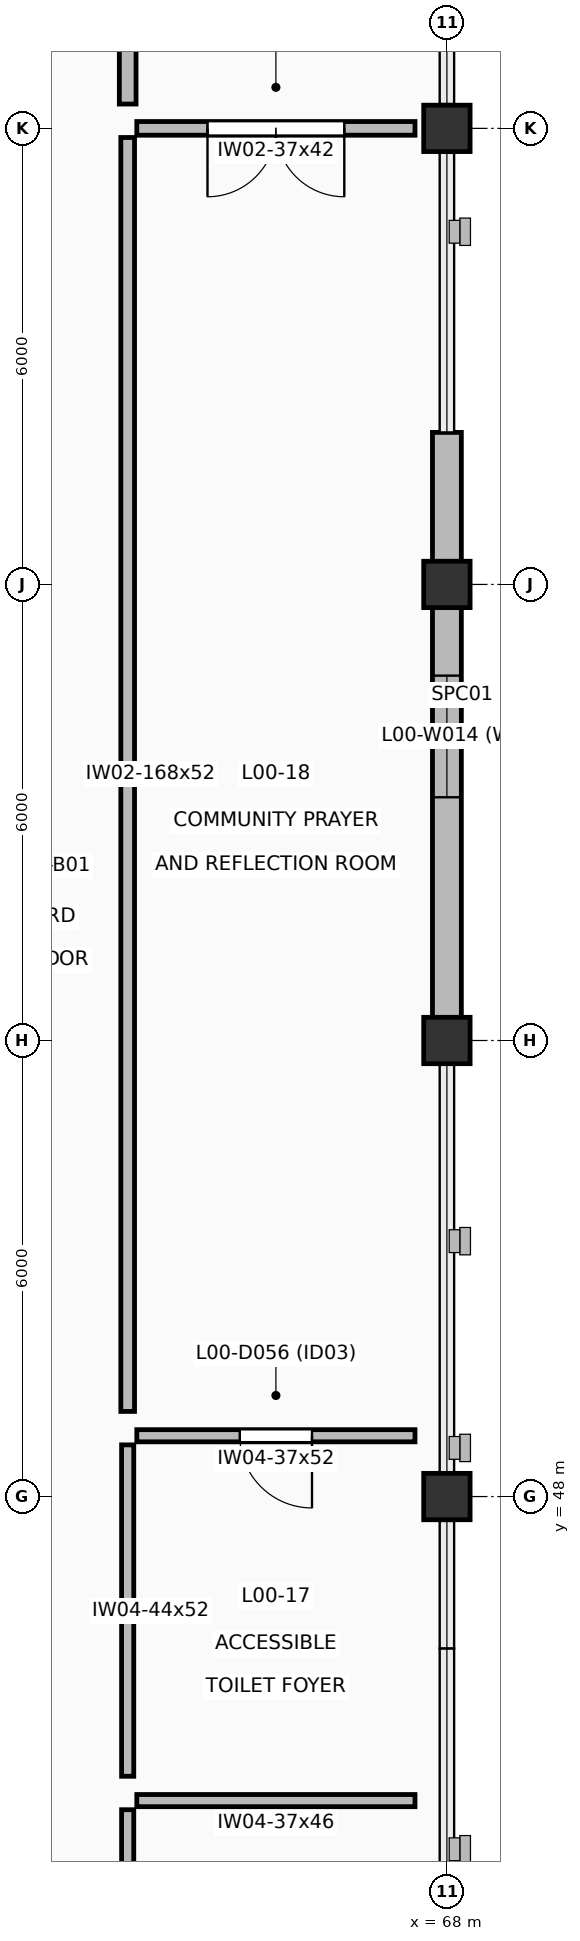
"""IFC4 building model, lengths in metres.
Left out: names, types, materials, properties, quantities, classifications, styles, units other than length and angle.
Written with IfcOpenShell. Run it as: python <this file> out.ifc"""

import sys

from ifc_helpers import new_model, si_unit, direction, frame, frame_2d, origin, origin_2d, place, context, subcontext, project, spatial, rectangle, extrude, element, fill, save


model = new_model("IFC4")
c1 = context("Model", 3, precision=1e-05, world=origin(), true_north=direction((0.0, 1.0)))
c2 = subcontext(c1, "Body", "Model", "MODEL_VIEW")
j1 = project(units=[si_unit("LENGTHUNIT", "METRE"), si_unit("PLANEANGLEUNIT", "RADIAN")], contexts=[c1])
p1 = place(None, origin())
s1 = spatial("IfcSite", under=j1, at=p1, CompositionType="ELEMENT")
p2 = place(p1, origin())
s2 = spatial("IfcBuilding", under=s1, at=p2, CompositionType="ELEMENT")
p3 = place(p2, origin())
s3 = spatial("IfcBuildingStorey", under=s2, at=p3, CompositionType="ELEMENT", Elevation=0.0)
for number, where, z_axis, x_axis in (
    (1, (68.0, 48.0, 0.0), (0.0, 0.0, 1.0), (1.0, 0.0, 0.0)),
    (2, (68.0, 54.0, 0.0), (0.0, 0.0, 1.0), (1.0, 0.0, 0.0)),
    (3, (68.0, 60.0, 0.0), (0.0, 0.0, 1.0), (1.0, 0.0, 0.0)),
    (4, (68.0, 66.0, 0.0), (0.0, 0.0, 1.0), (1.0, 0.0, 0.0)),
):
    element("IfcColumn", number, at=place(p3, frame(where, z_axis=z_axis, x_axis=x_axis)), inside=s3, PredefinedType="COLUMN", context=c2, shape_type="SweptSolid", body=[
        extrude(rectangle(XDim=0.61, YDim=0.61, at=origin_2d()), origin(), (0.0, 0.0, 1.0), 5.4),
    ])
p4 = place(p3, frame((68.0, 62.0, 0.0), z_axis=(0.0, 0.0, 1.0), x_axis=(0.0, -1.0, 0.0)))
e5 = element("IfcWall", 5, at=p4, inside=s3, PredefinedType="SOLIDWALL", context=c2, shape_type="SweptSolid", body=[
    extrude(rectangle(XDim=8.0, YDim=0.38, at=frame_2d((4.0, 0.0))), origin(), (0.0, 0.0, 1.0), 4.425),
])
p5 = place(p4, frame((3.2, 0.0, 0.85)))
e6 = element("IfcOpeningElement", 6, at=p5, cuts=e5, PredefinedType="OPENING", context=c2, shape_type="SweptSolid", body=[
    extrude(rectangle(XDim=1.6, YDim=2.0, at=frame_2d((0.8, 1.0))), frame((0.0, 0.2, 0.0), z_axis=(0.0, -1.0, 0.0), x_axis=(1.0, 0.0, 0.0)), (0.0, 0.0, 1.0), 0.4),
])
p6 = place(p3, frame((67.58, 44.0, 0.0), z_axis=(0.0, 0.0, 1.0), x_axis=(-1.0, 0.0, 0.0)))
e7 = element("IfcWall", 7, at=p6, inside=s3, PredefinedType="PLUMBINGWALL", context=c2, shape_type="SweptSolid", body=[
    extrude(rectangle(XDim=3.66, YDim=0.16, at=frame_2d((1.83, 0.0))), origin(), (0.0, 0.0, 1.0), 4.595),
])
p7 = place(p3, frame((63.8, 43.88, 0.0), z_axis=(0.0, 0.0, 1.0), x_axis=(0.0, -1.0, 0.0)))
e8 = element("IfcWall", 8, at=p7, inside=s3, PredefinedType="PLUMBINGWALL", context=c2, shape_type="SweptSolid", body=[
    extrude(rectangle(XDim=7.56, YDim=0.16, at=frame_2d((3.78, 0.0))), origin(), (0.0, 0.0, 1.0), 5.16),
])
p8 = place(p3, frame((67.58, 48.8, 0.0), z_axis=(0.0, 0.0, 1.0), x_axis=(-1.0, 0.0, 0.0)))
e9 = element("IfcWall", 9, at=p8, inside=s3, PredefinedType="PLUMBINGWALL", context=c2, shape_type="SweptSolid", body=[
    extrude(rectangle(XDim=3.66, YDim=0.16, at=frame_2d((1.83, 0.0))), origin(), (0.0, 0.0, 1.0), 5.16),
])
p9 = place(p8, frame((1.355, 0.0, 0.0)))
e10 = element("IfcOpeningElement", 10, at=p9, cuts=e9, PredefinedType="OPENING", context=c2, shape_type="SweptSolid", body=[
    extrude(rectangle(XDim=0.95, YDim=2.15, at=frame_2d((0.475, 1.075))), frame((0.0, 0.09, 0.0), z_axis=(0.0, -1.0, 0.0), x_axis=(1.0, 0.0, 0.0)), (0.0, 0.0, 1.0), 0.18),
])
p10 = place(p3, frame((63.8, 48.68, 0.0), z_axis=(0.0, 0.0, 1.0), x_axis=(0.0, -1.0, 0.0)))
e11 = element("IfcWall", 11, at=p10, inside=s3, PredefinedType="PLUMBINGWALL", context=c2, shape_type="SweptSolid", body=[
    extrude(rectangle(XDim=4.36, YDim=0.16, at=frame_2d((2.18, 0.0))), origin(), (0.0, 0.0, 1.0), 5.16),
])
p11 = place(p3, frame((67.58, 66.0, 0.0), z_axis=(0.0, 0.0, 1.0), x_axis=(-1.0, 0.0, 0.0)))
e12 = element("IfcWall", 12, at=p11, inside=s3, PredefinedType="PARTITIONING", context=c2, shape_type="SweptSolid", body=[
    extrude(rectangle(XDim=3.66, YDim=0.18, at=frame_2d((1.83, 0.0))), origin(), (0.0, 0.0, 1.0), 4.245),
])
p12 = place(p11, frame((0.93, 0.0, 0.0)))
e13 = element("IfcOpeningElement", 13, at=p12, cuts=e12, PredefinedType="OPENING", context=c2, shape_type="SweptSolid", body=[
    extrude(rectangle(XDim=1.8, YDim=2.3, at=frame_2d((0.9, 1.15))), frame((0.0, 0.1, 0.0), z_axis=(0.0, -1.0, 0.0), x_axis=(1.0, 0.0, 0.0)), (0.0, 0.0, 1.0), 0.2),
])
p13 = place(p3, frame((63.8, 65.88, 0.0), z_axis=(0.0, 0.0, 1.0), x_axis=(0.0, -1.0, 0.0)))
e14 = element("IfcWall", 14, at=p13, inside=s3, PredefinedType="PARTITIONING", context=c2, shape_type="SweptSolid", body=[
    extrude(rectangle(XDim=16.76, YDim=0.18, at=frame_2d((8.38, 0.0))), origin(), (0.0, 0.0, 1.0), 5.16),
])
p14 = place(p3, frame((63.8, 85.58, 0.0), z_axis=(0.0, 0.0, 1.0), x_axis=(0.0, -1.0, 0.0)))
e15 = element("IfcWall", 15, at=p14, inside=s3, PredefinedType="SOLIDWALL", context=c2, shape_type="SweptSolid", body=[
    extrude(rectangle(XDim=19.26, YDim=0.22, at=frame_2d((9.63, 0.0))), origin(), (0.0, 0.0, 1.0), 5.16),
])
p15 = place(p14, frame((9.18, 0.0, 0.0)))
e16 = element("IfcOpeningElement", 16, at=p15, cuts=e15, PredefinedType="OPENING", context=c2, shape_type="SweptSolid", body=[
    extrude(rectangle(XDim=0.9, YDim=2.1, at=frame_2d((0.45, 1.05))), frame((0.0, 0.12, 0.0), z_axis=(0.0, -1.0, 0.0), x_axis=(1.0, 0.0, 0.0)), (0.0, 0.0, 1.0), 0.24),
])
p16 = place(p5, origin())
e17 = element("IfcWindow", 17, at=p16, inside=s3, PartitioningType="DOUBLE_PANEL_VERTICAL", PredefinedType="WINDOW", context=c2, shape_type="SweptSolid", body=[
    extrude(rectangle(XDim=1.6, YDim=2.0, at=frame_2d((0.8, 1.0))), frame((0.0, 0.03, 0.0), z_axis=(0.0, -1.0, 0.0), x_axis=(1.0, 0.0, 0.0)), (0.0, 0.0, 1.0), 0.06),
])
fill(e6, e17)
p17 = place(p9, origin())
e18 = element("IfcDoor", 18, at=p17, inside=s3, OperationType="SINGLE_SWING_LEFT", PredefinedType="DOOR", context=c2, shape_type="SweptSolid", body=[
    extrude(rectangle(XDim=0.95, YDim=2.15, at=frame_2d((0.475, 1.075))), frame((0.0, 0.025, 0.0), z_axis=(0.0, -1.0, 0.0), x_axis=(1.0, 0.0, 0.0)), (0.0, 0.0, 1.0), 0.05),
])
fill(e10, e18)
p18 = place(p12, origin())
e19 = element("IfcDoor", 19, at=p18, inside=s3, OperationType="DOUBLE_DOOR_SINGLE_SWING", PredefinedType="DOOR", context=c2, shape_type="SweptSolid", body=[
    extrude(rectangle(XDim=1.8, YDim=2.3, at=frame_2d((0.9, 1.15))), frame((0.0, 0.025, 0.0), z_axis=(0.0, -1.0, 0.0), x_axis=(1.0, 0.0, 0.0)), (0.0, 0.0, 1.0), 0.05),
])
fill(e13, e19)
save(model, sys.argv[1])
